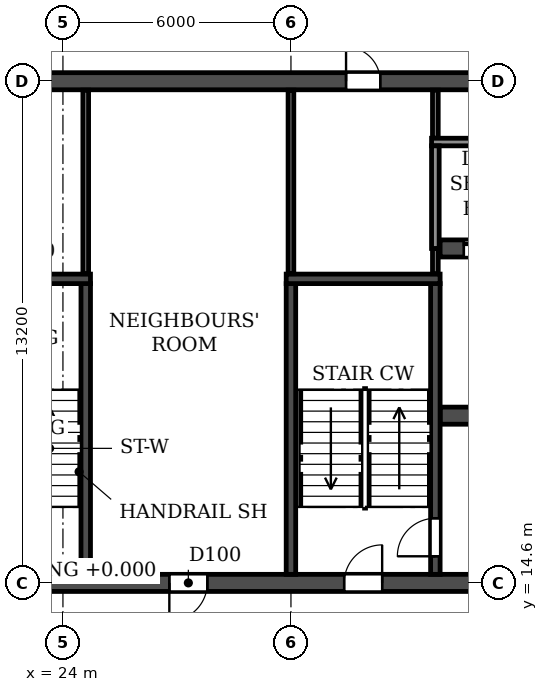
"""IFC4 building model, lengths in metres.
Left out: names, types, materials, properties, quantities, classifications, styles, units other than length and angle.
Written with IfcOpenShell. Run it as: python <this file> out.ifc"""

import sys

from ifc_helpers import new_model, si_unit, direction, frame, frame_2d, origin, place, context, subcontext, project, spatial, rectangle, extrude, element, fill, save


model = new_model("IFC4")
c1 = context("Model", 3, precision=1e-05, world=origin(), true_north=direction((0.0, 1.0)))
c2 = subcontext(c1, "Body", "Model", "MODEL_VIEW")
j1 = project(units=[si_unit("LENGTHUNIT", "METRE"), si_unit("PLANEANGLEUNIT", "RADIAN")], contexts=[c1])
p1 = place(None, origin())
s1 = spatial("IfcSite", under=j1, at=p1, CompositionType="ELEMENT")
p2 = place(p1, origin())
s2 = spatial("IfcBuilding", under=s1, at=p2, CompositionType="ELEMENT")
p3 = place(p2, frame((0.0, 0.0, 125.7)))
s3 = spatial("IfcBuildingStorey", under=s2, at=p3, CompositionType="ELEMENT", Elevation=125.7)
p4 = place(p3, frame((12.2, 14.6, 0.0), z_axis=(0.0, 0.0, 1.0), x_axis=(1.0, 0.0, 0.0)))
e1 = element("IfcWall", 1, at=p4, inside=s3, PredefinedType="SOLIDWALL", context=c2, shape_type="SweptSolid", body=[
    extrude(rectangle(XDim=77.6, YDim=0.45, at=frame_2d((38.8, 0.0))), origin(), (0.0, 0.0, 1.0), 3.07),
])
p5 = place(p4, frame((0.8, 0.0, 0.0)))
e2 = element("IfcOpeningElement", 2, at=p5, cuts=e1, PredefinedType="OPENING", context=c2, shape_type="SweptSolid", body=[
    extrude(rectangle(XDim=1.0, YDim=2.1, at=frame_2d((0.5, 1.05))), frame((0.0, 0.235, 0.0), z_axis=(0.0, -1.0, 0.0), x_axis=(1.0, 0.0, 0.0)), (0.0, 0.0, 1.0), 0.47),
])
p6 = place(p4, frame((3.8, 0.0, 0.0)))
e3 = element("IfcOpeningElement", 3, at=p6, cuts=e1, PredefinedType="OPENING", context=c2, shape_type="SweptSolid", body=[
    extrude(rectangle(XDim=1.0, YDim=2.1, at=frame_2d((0.5, 1.05))), frame((0.0, 0.235, 0.0), z_axis=(0.0, -1.0, 0.0), x_axis=(1.0, 0.0, 0.0)), (0.0, 0.0, 1.0), 0.47),
])
p7 = place(p4, frame((6.7, 0.0, 0.0)))
e4 = element("IfcOpeningElement", 4, at=p7, cuts=e1, PredefinedType="OPENING", context=c2, shape_type="SweptSolid", body=[
    extrude(rectangle(XDim=1.0, YDim=2.1, at=frame_2d((0.5, 1.05))), frame((0.0, 0.235, 0.0), z_axis=(0.0, -1.0, 0.0), x_axis=(1.0, 0.0, 0.0)), (0.0, 0.0, 1.0), 0.47),
])
p8 = place(p4, frame((14.6, 0.0, 0.0)))
e5 = element("IfcOpeningElement", 5, at=p8, cuts=e1, PredefinedType="OPENING", context=c2, shape_type="SweptSolid", body=[
    extrude(rectangle(XDim=1.0, YDim=2.1, at=frame_2d((0.5, 1.05))), frame((0.0, 0.235, 0.0), z_axis=(0.0, -1.0, 0.0), x_axis=(1.0, 0.0, 0.0)), (0.0, 0.0, 1.0), 0.47),
])
p9 = place(p4, frame((19.2, 0.0, 0.0)))
e6 = element("IfcOpeningElement", 6, at=p9, cuts=e1, PredefinedType="OPENING", context=c2, shape_type="SweptSolid", body=[
    extrude(rectangle(XDim=1.0, YDim=2.1, at=frame_2d((0.5, 1.05))), frame((0.0, 0.235, 0.0), z_axis=(0.0, -1.0, 0.0), x_axis=(1.0, 0.0, 0.0)), (0.0, 0.0, 1.0), 0.47),
])
p10 = place(p4, frame((30.5, 0.0, 0.0)))
e7 = element("IfcOpeningElement", 7, at=p10, cuts=e1, PredefinedType="OPENING", context=c2, shape_type="SweptSolid", body=[
    extrude(rectangle(XDim=1.0, YDim=2.1, at=frame_2d((0.5, 1.05))), frame((0.0, 0.235, 0.0), z_axis=(0.0, -1.0, 0.0), x_axis=(1.0, 0.0, 0.0)), (0.0, 0.0, 1.0), 0.47),
])
p11 = place(p4, frame((34.4, 0.0, 0.0)))
e8 = element("IfcOpeningElement", 8, at=p11, cuts=e1, PredefinedType="OPENING", context=c2, shape_type="SweptSolid", body=[
    extrude(rectangle(XDim=1.0, YDim=2.1, at=frame_2d((0.5, 1.05))), frame((0.0, 0.235, 0.0), z_axis=(0.0, -1.0, 0.0), x_axis=(1.0, 0.0, 0.0)), (0.0, 0.0, 1.0), 0.47),
])
p12 = place(p4, frame((38.3, 0.0, 0.0)))
e9 = element("IfcOpeningElement", 9, at=p12, cuts=e1, PredefinedType="OPENING", context=c2, shape_type="SweptSolid", body=[
    extrude(rectangle(XDim=1.0, YDim=2.1, at=frame_2d((0.5, 1.05))), frame((0.0, 0.235, 0.0), z_axis=(0.0, -1.0, 0.0), x_axis=(1.0, 0.0, 0.0)), (0.0, 0.0, 1.0), 0.47),
])
p13 = place(p4, frame((40.9, 0.0, 0.0)))
e10 = element("IfcOpeningElement", 10, at=p13, cuts=e1, PredefinedType="OPENING", context=c2, shape_type="SweptSolid", body=[
    extrude(rectangle(XDim=1.0, YDim=2.1, at=frame_2d((0.5, 1.05))), frame((0.0, 0.235, 0.0), z_axis=(0.0, -1.0, 0.0), x_axis=(1.0, 0.0, 0.0)), (0.0, 0.0, 1.0), 0.47),
])
p14 = place(p4, frame((44.8, 0.0, 0.0)))
e11 = element("IfcOpeningElement", 11, at=p14, cuts=e1, PredefinedType="OPENING", context=c2, shape_type="SweptSolid", body=[
    extrude(rectangle(XDim=1.0, YDim=2.1, at=frame_2d((0.5, 1.05))), frame((0.0, 0.235, 0.0), z_axis=(0.0, -1.0, 0.0), x_axis=(1.0, 0.0, 0.0)), (0.0, 0.0, 1.0), 0.47),
])
p15 = place(p4, frame((57.4, 0.0, 0.0)))
e12 = element("IfcOpeningElement", 12, at=p15, cuts=e1, PredefinedType="OPENING", context=c2, shape_type="SweptSolid", body=[
    extrude(rectangle(XDim=1.0, YDim=2.1, at=frame_2d((0.5, 1.05))), frame((0.0, 0.235, 0.0), z_axis=(0.0, -1.0, 0.0), x_axis=(1.0, 0.0, 0.0)), (0.0, 0.0, 1.0), 0.47),
])
p16 = place(p4, frame((62.0, 0.0, 0.0)))
e13 = element("IfcOpeningElement", 13, at=p16, cuts=e1, PredefinedType="OPENING", context=c2, shape_type="SweptSolid", body=[
    extrude(rectangle(XDim=1.0, YDim=2.1, at=frame_2d((0.5, 1.05))), frame((0.0, 0.235, 0.0), z_axis=(0.0, -1.0, 0.0), x_axis=(1.0, 0.0, 0.0)), (0.0, 0.0, 1.0), 0.47),
])
p17 = place(p4, frame((69.9, 0.0, 0.0)))
e14 = element("IfcOpeningElement", 14, at=p17, cuts=e1, PredefinedType="OPENING", context=c2, shape_type="SweptSolid", body=[
    extrude(rectangle(XDim=1.0, YDim=2.1, at=frame_2d((0.5, 1.05))), frame((0.0, 0.235, 0.0), z_axis=(0.0, -1.0, 0.0), x_axis=(1.0, 0.0, 0.0)), (0.0, 0.0, 1.0), 0.47),
])
p18 = place(p4, frame((72.8, 0.0, 0.0)))
e15 = element("IfcOpeningElement", 15, at=p18, cuts=e1, PredefinedType="OPENING", context=c2, shape_type="SweptSolid", body=[
    extrude(rectangle(XDim=1.0, YDim=2.1, at=frame_2d((0.5, 1.05))), frame((0.0, 0.235, 0.0), z_axis=(0.0, -1.0, 0.0), x_axis=(1.0, 0.0, 0.0)), (0.0, 0.0, 1.0), 0.47),
])
p19 = place(p4, frame((75.8, 0.0, 0.0)))
e16 = element("IfcOpeningElement", 16, at=p19, cuts=e1, PredefinedType="OPENING", context=c2, shape_type="SweptSolid", body=[
    extrude(rectangle(XDim=1.0, YDim=2.1, at=frame_2d((0.5, 1.05))), frame((0.0, 0.235, 0.0), z_axis=(0.0, -1.0, 0.0), x_axis=(1.0, 0.0, 0.0)), (0.0, 0.0, 1.0), 0.47),
])
p20 = place(p3, frame((12.2, 27.8, 0.0), z_axis=(0.0, 0.0, 1.0), x_axis=(1.0, 0.0, 0.0)))
e17 = element("IfcWall", 17, at=p20, inside=s3, PredefinedType="SOLIDWALL", context=c2, shape_type="SweptSolid", body=[
    extrude(rectangle(XDim=77.6, YDim=0.45, at=frame_2d((38.8, 0.0))), origin(), (0.0, 0.0, 1.0), 3.07),
])
p21 = place(p20, frame((0.8, 0.0, 0.0)))
e18 = element("IfcOpeningElement", 18, at=p21, cuts=e17, PredefinedType="OPENING", context=c2, shape_type="SweptSolid", body=[
    extrude(rectangle(XDim=1.0, YDim=2.1, at=frame_2d((0.5, 1.05))), frame((0.0, 0.235, 0.0), z_axis=(0.0, -1.0, 0.0), x_axis=(1.0, 0.0, 0.0)), (0.0, 0.0, 1.0), 0.47),
])
p22 = place(p20, frame((3.8, 0.0, 0.0)))
e19 = element("IfcOpeningElement", 19, at=p22, cuts=e17, PredefinedType="OPENING", context=c2, shape_type="SweptSolid", body=[
    extrude(rectangle(XDim=1.0, YDim=2.1, at=frame_2d((0.5, 1.05))), frame((0.0, 0.235, 0.0), z_axis=(0.0, -1.0, 0.0), x_axis=(1.0, 0.0, 0.0)), (0.0, 0.0, 1.0), 0.47),
])
p23 = place(p20, frame((6.7, 0.0, 0.0)))
e20 = element("IfcOpeningElement", 20, at=p23, cuts=e17, PredefinedType="OPENING", context=c2, shape_type="SweptSolid", body=[
    extrude(rectangle(XDim=1.0, YDim=2.1, at=frame_2d((0.5, 1.05))), frame((0.0, 0.235, 0.0), z_axis=(0.0, -1.0, 0.0), x_axis=(1.0, 0.0, 0.0)), (0.0, 0.0, 1.0), 0.47),
])
p24 = place(p20, frame((10.05, 0.0, 0.0)))
e21 = element("IfcOpeningElement", 21, at=p24, cuts=e17, PredefinedType="OPENING", context=c2, shape_type="SweptSolid", body=[
    extrude(rectangle(XDim=0.9, YDim=2.1, at=frame_2d((0.45, 1.05))), frame((0.0, 0.235, 0.0), z_axis=(0.0, -1.0, 0.0), x_axis=(1.0, 0.0, 0.0)), (0.0, 0.0, 1.0), 0.47),
])
p25 = place(p20, frame((19.25, 0.0, 0.0)))
e22 = element("IfcOpeningElement", 22, at=p25, cuts=e17, PredefinedType="OPENING", context=c2, shape_type="SweptSolid", body=[
    extrude(rectangle(XDim=0.9, YDim=2.1, at=frame_2d((0.45, 1.05))), frame((0.0, 0.235, 0.0), z_axis=(0.0, -1.0, 0.0), x_axis=(1.0, 0.0, 0.0)), (0.0, 0.0, 1.0), 0.47),
])
p26 = place(p20, frame((25.0, 0.0, 0.0)))
e23 = element("IfcOpeningElement", 23, at=p26, cuts=e17, PredefinedType="OPENING", context=c2, shape_type="SweptSolid", body=[
    extrude(rectangle(XDim=1.0, YDim=2.1, at=frame_2d((0.5, 1.05))), frame((0.0, 0.235, 0.0), z_axis=(0.0, -1.0, 0.0), x_axis=(1.0, 0.0, 0.0)), (0.0, 0.0, 1.0), 0.47),
])
p27 = place(p20, frame((30.2, 0.0, 0.0)))
e24 = element("IfcOpeningElement", 24, at=p27, cuts=e17, PredefinedType="OPENING", context=c2, shape_type="SweptSolid", body=[
    extrude(rectangle(XDim=1.0, YDim=2.1, at=frame_2d((0.5, 1.05))), frame((0.0, 0.235, 0.0), z_axis=(0.0, -1.0, 0.0), x_axis=(1.0, 0.0, 0.0)), (0.0, 0.0, 1.0), 0.47),
])
p28 = place(p20, frame((35.4, 0.0, 0.0)))
e25 = element("IfcOpeningElement", 25, at=p28, cuts=e17, PredefinedType="OPENING", context=c2, shape_type="SweptSolid", body=[
    extrude(rectangle(XDim=1.0, YDim=2.1, at=frame_2d((0.5, 1.05))), frame((0.0, 0.235, 0.0), z_axis=(0.0, -1.0, 0.0), x_axis=(1.0, 0.0, 0.0)), (0.0, 0.0, 1.0), 0.47),
])
p29 = place(p20, frame((38.3, 0.0, 0.0)))
e26 = element("IfcOpeningElement", 26, at=p29, cuts=e17, PredefinedType="OPENING", context=c2, shape_type="SweptSolid", body=[
    extrude(rectangle(XDim=1.0, YDim=2.1, at=frame_2d((0.5, 1.05))), frame((0.0, 0.235, 0.0), z_axis=(0.0, -1.0, 0.0), x_axis=(1.0, 0.0, 0.0)), (0.0, 0.0, 1.0), 0.47),
])
p30 = place(p20, frame((42.5, 0.0, 0.0)))
e27 = element("IfcOpeningElement", 27, at=p30, cuts=e17, PredefinedType="OPENING", context=c2, shape_type="SweptSolid", body=[
    extrude(rectangle(XDim=1.0, YDim=2.1, at=frame_2d((0.5, 1.05))), frame((0.0, 0.235, 0.0), z_axis=(0.0, -1.0, 0.0), x_axis=(1.0, 0.0, 0.0)), (0.0, 0.0, 1.0), 0.47),
])
p31 = place(p20, frame((46.4, 0.0, 0.0)))
e28 = element("IfcOpeningElement", 28, at=p31, cuts=e17, PredefinedType="OPENING", context=c2, shape_type="SweptSolid", body=[
    extrude(rectangle(XDim=1.0, YDim=2.1, at=frame_2d((0.5, 1.05))), frame((0.0, 0.235, 0.0), z_axis=(0.0, -1.0, 0.0), x_axis=(1.0, 0.0, 0.0)), (0.0, 0.0, 1.0), 0.47),
])
p32 = place(p20, frame((49.0, 0.0, 0.0)))
e29 = element("IfcOpeningElement", 29, at=p32, cuts=e17, PredefinedType="OPENING", context=c2, shape_type="SweptSolid", body=[
    extrude(rectangle(XDim=1.0, YDim=2.1, at=frame_2d((0.5, 1.05))), frame((0.0, 0.235, 0.0), z_axis=(0.0, -1.0, 0.0), x_axis=(1.0, 0.0, 0.0)), (0.0, 0.0, 1.0), 0.47),
])
p33 = place(p20, frame((52.65, 0.0, 0.0)))
e30 = element("IfcOpeningElement", 30, at=p33, cuts=e17, PredefinedType="OPENING", context=c2, shape_type="SweptSolid", body=[
    extrude(rectangle(XDim=1.5, YDim=2.1, at=frame_2d((0.75, 1.05))), frame((0.0, 0.235, 0.0), z_axis=(0.0, -1.0, 0.0), x_axis=(1.0, 0.0, 0.0)), (0.0, 0.0, 1.0), 0.47),
])
p34 = place(p20, frame((57.45, 0.0, 0.0)))
e31 = element("IfcOpeningElement", 31, at=p34, cuts=e17, PredefinedType="OPENING", context=c2, shape_type="SweptSolid", body=[
    extrude(rectangle(XDim=0.9, YDim=2.1, at=frame_2d((0.45, 1.05))), frame((0.0, 0.235, 0.0), z_axis=(0.0, -1.0, 0.0), x_axis=(1.0, 0.0, 0.0)), (0.0, 0.0, 1.0), 0.47),
])
p35 = place(p20, frame((66.65, 0.0, 0.0)))
e32 = element("IfcOpeningElement", 32, at=p35, cuts=e17, PredefinedType="OPENING", context=c2, shape_type="SweptSolid", body=[
    extrude(rectangle(XDim=0.9, YDim=2.1, at=frame_2d((0.45, 1.05))), frame((0.0, 0.235, 0.0), z_axis=(0.0, -1.0, 0.0), x_axis=(1.0, 0.0, 0.0)), (0.0, 0.0, 1.0), 0.47),
])
p36 = place(p20, frame((69.9, 0.0, 0.0)))
e33 = element("IfcOpeningElement", 33, at=p36, cuts=e17, PredefinedType="OPENING", context=c2, shape_type="SweptSolid", body=[
    extrude(rectangle(XDim=1.0, YDim=2.1, at=frame_2d((0.5, 1.05))), frame((0.0, 0.235, 0.0), z_axis=(0.0, -1.0, 0.0), x_axis=(1.0, 0.0, 0.0)), (0.0, 0.0, 1.0), 0.47),
])
p37 = place(p20, frame((72.8, 0.0, 0.0)))
e34 = element("IfcOpeningElement", 34, at=p37, cuts=e17, PredefinedType="OPENING", context=c2, shape_type="SweptSolid", body=[
    extrude(rectangle(XDim=1.0, YDim=2.1, at=frame_2d((0.5, 1.05))), frame((0.0, 0.235, 0.0), z_axis=(0.0, -1.0, 0.0), x_axis=(1.0, 0.0, 0.0)), (0.0, 0.0, 1.0), 0.47),
])
p38 = place(p20, frame((75.8, 0.0, 0.0)))
e35 = element("IfcOpeningElement", 35, at=p38, cuts=e17, PredefinedType="OPENING", context=c2, shape_type="SweptSolid", body=[
    extrude(rectangle(XDim=1.0, YDim=2.1, at=frame_2d((0.5, 1.05))), frame((0.0, 0.235, 0.0), z_axis=(0.0, -1.0, 0.0), x_axis=(1.0, 0.0, 0.0)), (0.0, 0.0, 1.0), 0.47),
])
p39 = place(p3, frame((33.925, 19.0, 0.0), z_axis=(0.0, 0.0, 1.0), x_axis=(1.0, 0.0, 0.0)))
e36 = element("IfcWall", 36, at=p39, inside=s3, PredefinedType="SOLIDWALL", context=c2, shape_type="SweptSolid", body=[
    extrude(rectangle(XDim=34.15, YDim=0.45, at=frame_2d((17.075, 0.0))), origin(), (0.0, 0.0, 1.0), 3.07),
])
p40 = place(p39, frame((16.175, 0.0, 0.0)))
e37 = element("IfcOpeningElement", 37, at=p40, cuts=e36, PredefinedType="OPENING", context=c2, shape_type="SweptSolid", body=[
    extrude(rectangle(XDim=1.8, YDim=2.1, at=frame_2d((0.9, 1.05))), frame((0.0, 0.235, 0.0), z_axis=(0.0, -1.0, 0.0), x_axis=(1.0, 0.0, 0.0)), (0.0, 0.0, 1.0), 0.47),
])
p41 = place(p39, frame((1.525, 0.0, 0.0)))
e38 = element("IfcOpeningElement", 38, at=p41, cuts=e36, PredefinedType="OPENING", context=c2, shape_type="SweptSolid", body=[
    extrude(rectangle(XDim=1.8, YDim=2.1, at=frame_2d((0.9, 1.05))), frame((0.0, 0.235, 0.0), z_axis=(0.0, -1.0, 0.0), x_axis=(1.0, 0.0, 0.0)), (0.0, 0.0, 1.0), 0.47),
])
p42 = place(p39, frame((30.825, 0.0, 0.0)))
e39 = element("IfcOpeningElement", 39, at=p42, cuts=e36, PredefinedType="OPENING", context=c2, shape_type="SweptSolid", body=[
    extrude(rectangle(XDim=1.8, YDim=2.1, at=frame_2d((0.9, 1.05))), frame((0.0, 0.235, 0.0), z_axis=(0.0, -1.0, 0.0), x_axis=(1.0, 0.0, 0.0)), (0.0, 0.0, 1.0), 0.47),
])
p43 = place(p3, frame((33.925, 23.4, 0.0), z_axis=(0.0, 0.0, 1.0), x_axis=(1.0, 0.0, 0.0)))
e40 = element("IfcWall", 40, at=p43, inside=s3, PredefinedType="SOLIDWALL", context=c2, shape_type="SweptSolid", body=[
    extrude(rectangle(XDim=34.15, YDim=0.45, at=frame_2d((17.075, 0.0))), origin(), (0.0, 0.0, 1.0), 3.07),
])
p44 = place(p43, frame((16.175, 0.0, 0.0)))
e41 = element("IfcOpeningElement", 41, at=p44, cuts=e40, PredefinedType="OPENING", context=c2, shape_type="SweptSolid", body=[
    extrude(rectangle(XDim=1.8, YDim=2.1, at=frame_2d((0.9, 1.05))), frame((0.0, 0.235, 0.0), z_axis=(0.0, -1.0, 0.0), x_axis=(1.0, 0.0, 0.0)), (0.0, 0.0, 1.0), 0.47),
])
p45 = place(p43, frame((0.625, 0.0, 0.0)))
e42 = element("IfcOpeningElement", 42, at=p45, cuts=e40, PredefinedType="OPENING", context=c2, shape_type="SweptSolid", body=[
    extrude(rectangle(XDim=1.1, YDim=2.1, at=frame_2d((0.55, 1.05))), frame((0.0, 0.235, 0.0), z_axis=(0.0, -1.0, 0.0), x_axis=(1.0, 0.0, 0.0)), (0.0, 0.0, 1.0), 0.47),
])
p46 = place(p43, frame((3.225, 0.0, 0.0)))
e43 = element("IfcOpeningElement", 43, at=p46, cuts=e40, PredefinedType="OPENING", context=c2, shape_type="SweptSolid", body=[
    extrude(rectangle(XDim=1.1, YDim=2.1, at=frame_2d((0.55, 1.05))), frame((0.0, 0.235, 0.0), z_axis=(0.0, -1.0, 0.0), x_axis=(1.0, 0.0, 0.0)), (0.0, 0.0, 1.0), 0.47),
])
p47 = place(p43, frame((5.825, 0.0, 0.0)))
e44 = element("IfcOpeningElement", 44, at=p47, cuts=e40, PredefinedType="OPENING", context=c2, shape_type="SweptSolid", body=[
    extrude(rectangle(XDim=1.1, YDim=2.1, at=frame_2d((0.55, 1.05))), frame((0.0, 0.235, 0.0), z_axis=(0.0, -1.0, 0.0), x_axis=(1.0, 0.0, 0.0)), (0.0, 0.0, 1.0), 0.47),
])
p48 = place(p43, frame((8.425, 0.0, 0.0)))
e45 = element("IfcOpeningElement", 45, at=p48, cuts=e40, PredefinedType="OPENING", context=c2, shape_type="SweptSolid", body=[
    extrude(rectangle(XDim=1.1, YDim=2.1, at=frame_2d((0.55, 1.05))), frame((0.0, 0.235, 0.0), z_axis=(0.0, -1.0, 0.0), x_axis=(1.0, 0.0, 0.0)), (0.0, 0.0, 1.0), 0.47),
])
p49 = place(p43, frame((11.025, 0.0, 0.0)))
e46 = element("IfcOpeningElement", 46, at=p49, cuts=e40, PredefinedType="OPENING", context=c2, shape_type="SweptSolid", body=[
    extrude(rectangle(XDim=1.1, YDim=2.1, at=frame_2d((0.55, 1.05))), frame((0.0, 0.235, 0.0), z_axis=(0.0, -1.0, 0.0), x_axis=(1.0, 0.0, 0.0)), (0.0, 0.0, 1.0), 0.47),
])
p50 = place(p43, frame((13.625, 0.0, 0.0)))
e47 = element("IfcOpeningElement", 47, at=p50, cuts=e40, PredefinedType="OPENING", context=c2, shape_type="SweptSolid", body=[
    extrude(rectangle(XDim=1.1, YDim=2.1, at=frame_2d((0.55, 1.05))), frame((0.0, 0.235, 0.0), z_axis=(0.0, -1.0, 0.0), x_axis=(1.0, 0.0, 0.0)), (0.0, 0.0, 1.0), 0.47),
])
p51 = place(p43, frame((27.225, 0.0, 0.0)))
e48 = element("IfcOpeningElement", 48, at=p51, cuts=e40, PredefinedType="OPENING", context=c2, shape_type="SweptSolid", body=[
    extrude(rectangle(XDim=1.1, YDim=2.1, at=frame_2d((0.55, 1.05))), frame((0.0, 0.235, 0.0), z_axis=(0.0, -1.0, 0.0), x_axis=(1.0, 0.0, 0.0)), (0.0, 0.0, 1.0), 0.47),
])
p52 = place(p3, frame((30.0, 14.825, 0.0), z_axis=(0.0, 0.0, 1.0), x_axis=(0.0, 1.0, 0.0)))
e49 = element("IfcWall", 49, at=p52, inside=s3, PredefinedType="SOLIDWALL", context=c2, shape_type="SweptSolid", body=[
    extrude(rectangle(XDim=7.65, YDim=0.25, at=frame_2d((3.825, 0.0))), origin(), (0.0, 0.0, 1.0), 3.07),
])
p53 = place(p3, frame((33.8, 14.825, 0.0), z_axis=(0.0, 0.0, 1.0), x_axis=(0.0, 1.0, 0.0)))
e50 = element("IfcWall", 50, at=p53, inside=s3, PredefinedType="SOLIDWALL", context=c2, shape_type="SweptSolid", body=[
    extrude(rectangle(XDim=7.65, YDim=0.25, at=frame_2d((3.825, 0.0))), origin(), (0.0, 0.0, 1.0), 3.07),
])
p54 = place(p53, frame((0.475, 0.0, 0.0)))
e51 = element("IfcOpeningElement", 51, at=p54, cuts=e50, PredefinedType="OPENING", context=c2, shape_type="SweptSolid", body=[
    extrude(rectangle(XDim=1.0, YDim=2.1, at=frame_2d((0.5, 1.05))), frame((0.0, 0.135, 0.0), z_axis=(0.0, -1.0, 0.0), x_axis=(1.0, 0.0, 0.0)), (0.0, 0.0, 1.0), 0.27),
])
p55 = place(p3, frame((29.875, 22.6, 0.0), z_axis=(0.0, 0.0, 1.0), x_axis=(1.0, 0.0, 0.0)))
e52 = element("IfcWall", 52, at=p55, inside=s3, PredefinedType="SOLIDWALL", context=c2, shape_type="SweptSolid", body=[
    extrude(rectangle(XDim=4.05, YDim=0.25, at=frame_2d((2.025, 0.0))), origin(), (0.0, 0.0, 1.0), 3.07),
])
p56 = place(p3, frame((24.6, 14.825, 0.0), z_axis=(0.0, 0.0, 1.0), x_axis=(0.0, 1.0, 0.0)))
e53 = element("IfcWall", 53, at=p56, inside=s3, PredefinedType="SOLIDWALL", context=c2, shape_type="SweptSolid", body=[
    extrude(rectangle(XDim=7.65, YDim=0.25, at=frame_2d((3.825, 0.0))), origin(), (0.0, 0.0, 1.0), 3.07),
])
p57 = place(p3, frame((20.675, 22.6, 0.0), z_axis=(0.0, 0.0, 1.0), x_axis=(1.0, 0.0, 0.0)))
e54 = element("IfcWall", 54, at=p57, inside=s3, PredefinedType="SOLIDWALL", context=c2, shape_type="SweptSolid", body=[
    extrude(rectangle(XDim=4.05, YDim=0.25, at=frame_2d((2.025, 0.0))), origin(), (0.0, 0.0, 1.0), 3.07),
])
for number, where, z_axis, x_axis in (
    (55, (24.6, 22.735, 0.0), (0.0, 0.0, 1.0), (0.0, 1.0, 0.0)),
    (56, (30.0, 22.735, 0.0), (0.0, 0.0, 1.0), (0.0, 1.0, 0.0)),
):
    element("IfcWall", number, at=place(p3, frame(where, z_axis=z_axis, x_axis=x_axis)), inside=s3, PredefinedType="PARTITIONING", context=c2, shape_type="SweptSolid", body=[
        extrude(rectangle(XDim=4.83, YDim=0.15, at=frame_2d((2.415, 0.0))), origin(), (0.0, 0.0, 1.0), 3.07),
    ])
p58 = place(p3, frame((33.8, 22.735, 0.0), z_axis=(0.0, 0.0, 1.0), x_axis=(0.0, 1.0, 0.0)))
e57 = element("IfcWall", 57, at=p58, inside=s3, PredefinedType="PARTITIONING", context=c2, shape_type="SweptSolid", body=[
    extrude(rectangle(XDim=0.665, YDim=0.15, at=frame_2d((0.333, 0.0))), origin(), (0.0, 0.0, 1.0), 3.07),
])
p59 = place(p3, frame((33.8, 26.3, 0.0), z_axis=(0.0, 0.0, 1.0), x_axis=(0.0, 1.0, 0.0)))
e58 = element("IfcWall", 58, at=p59, inside=s3, PredefinedType="PARTITIONING", context=c2, shape_type="SweptSolid", body=[
    extrude(rectangle(XDim=1.265, YDim=0.15, at=frame_2d((0.632, 0.0))), origin(), (0.0, 0.0, 1.0), 3.07),
])
p60 = place(p3, frame((33.7, 26.2, 0.0), z_axis=(0.0, 0.0, 1.0), x_axis=(1.0, 0.0, 0.0)))
e59 = element("IfcWall", 59, at=p60, inside=s3, PredefinedType="PARTITIONING", context=c2, shape_type="SweptSolid", body=[
    extrude(rectangle(XDim=10.4, YDim=0.2, at=frame_2d((5.2, 0.0))), origin(), (0.0, 0.0, 1.0), 3.07),
])
p61 = place(p3, frame((33.8, 23.4, 0.0), z_axis=(0.0, 0.0, 1.0), x_axis=(0.0, 1.0, 0.0)))
e60 = element("IfcWall", 60, at=p61, inside=s3, PredefinedType="PARTITIONING", context=c2, shape_type="SweptSolid", body=[
    extrude(rectangle(XDim=2.7, YDim=0.2, at=frame_2d((1.35, 0.0))), origin(), (0.0, 0.0, 1.0), 3.07),
])
p62 = place(p25, origin())
e61 = element("IfcDoor", 61, at=p62, inside=s3, OperationType="SINGLE_SWING_LEFT", PredefinedType="DOOR", context=c2, shape_type="SweptSolid", body=[
    extrude(rectangle(XDim=0.9, YDim=2.1, at=frame_2d((0.45, 1.05))), frame((0.0, 0.025, 0.0), z_axis=(0.0, -1.0, 0.0), x_axis=(1.0, 0.0, 0.0)), (0.0, 0.0, 1.0), 0.05),
])
fill(e22, e61)
p63 = place(p8, frame((1.0, 0.0, 0.0), z_axis=(0.0, 0.0, 1.0), x_axis=(-1.0, 0.0, 0.0)))
e62 = element("IfcDoor", 62, at=p63, inside=s3, OperationType="SINGLE_SWING_RIGHT", PredefinedType="DOOR", context=c2, shape_type="SweptSolid", body=[
    extrude(rectangle(XDim=1.0, YDim=2.1, at=frame_2d((0.5, 1.05))), frame((0.0, 0.025, 0.0), z_axis=(0.0, -1.0, 0.0), x_axis=(1.0, 0.0, 0.0)), (0.0, 0.0, 1.0), 0.05),
])
fill(e5, e62)
p64 = place(p9, origin())
e63 = element("IfcDoor", 63, at=p64, inside=s3, OperationType="SINGLE_SWING_RIGHT", PredefinedType="DOOR", context=c2, shape_type="SweptSolid", body=[
    extrude(rectangle(XDim=1.0, YDim=2.1, at=frame_2d((0.5, 1.05))), frame((0.0, 0.025, 0.0), z_axis=(0.0, -1.0, 0.0), x_axis=(1.0, 0.0, 0.0)), (0.0, 0.0, 1.0), 0.05),
])
fill(e6, e63)
p65 = place(p54, origin())
e64 = element("IfcDoor", 64, at=p65, inside=s3, OperationType="SINGLE_SWING_LEFT", PredefinedType="DOOR", context=c2, shape_type="SweptSolid", body=[
    extrude(rectangle(XDim=1.0, YDim=2.1, at=frame_2d((0.5, 1.05))), frame((0.0, 0.025, 0.0), z_axis=(0.0, -1.0, 0.0), x_axis=(1.0, 0.0, 0.0)), (0.0, 0.0, 1.0), 0.05),
])
fill(e51, e64)
p66 = place(p45, origin())
e65 = element("IfcDoor", 65, at=p66, inside=s3, OperationType="DOUBLE_DOOR_SLIDING", PredefinedType="DOOR", context=c2, shape_type="SweptSolid", body=[
    extrude(rectangle(XDim=1.1, YDim=2.1, at=frame_2d((0.55, 1.05))), frame((0.0, 0.025, 0.0), z_axis=(0.0, -1.0, 0.0), x_axis=(1.0, 0.0, 0.0)), (0.0, 0.0, 1.0), 0.05),
])
fill(e42, e65)
save(model, sys.argv[1])
